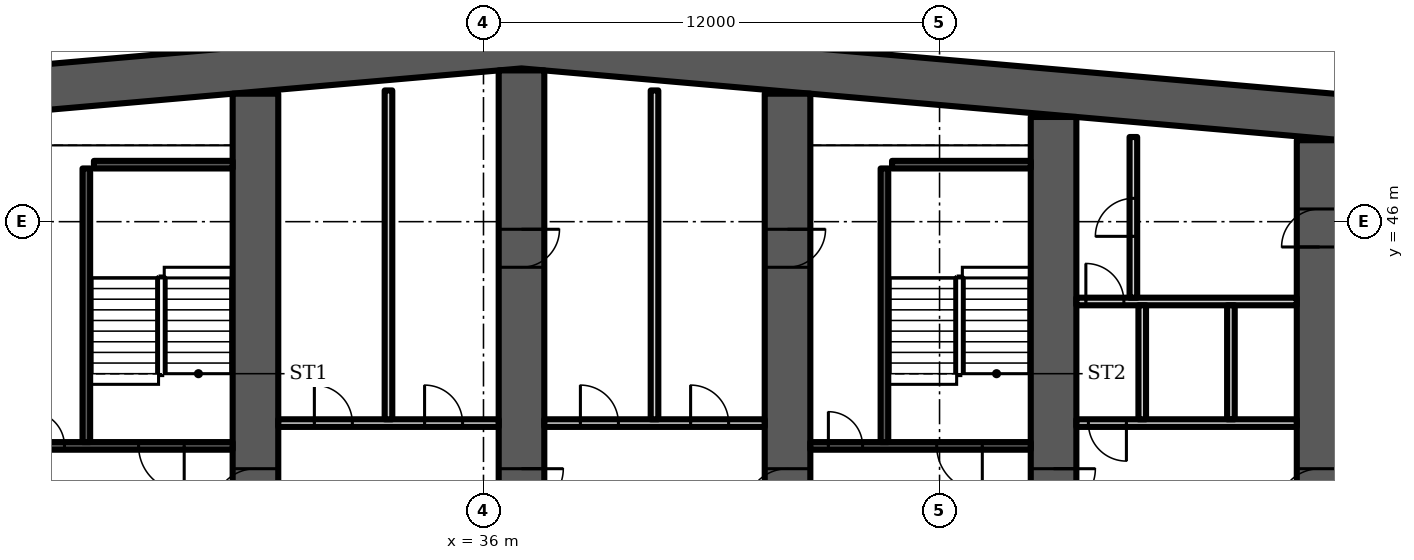
"""IFC4 building model, lengths in metres.
Left out: names, types, materials, properties, quantities, classifications, styles, units other than length and angle.
Written with IfcOpenShell. Run it as: python <this file> out.ifc"""

import sys

from ifc_helpers import new_model, si_unit, direction, frame, frame_2d, origin, place, context, subcontext, project, spatial, polyline, rectangle, outline, extrude, element, fill, save


model = new_model("IFC4")
c1 = context("Model", 3, precision=1e-05, world=origin(), true_north=direction((0.0, 1.0)))
c2 = subcontext(c1, "Body", "Model", "MODEL_VIEW")
j1 = project(units=[si_unit("LENGTHUNIT", "METRE"), si_unit("PLANEANGLEUNIT", "RADIAN")], contexts=[c1])
p1 = place(None, origin())
s1 = spatial("IfcSite", under=j1, at=p1, CompositionType="ELEMENT")
p2 = place(p1, origin())
s2 = spatial("IfcBuilding", under=s1, at=p2, CompositionType="ELEMENT")
p3 = place(p2, frame((0.0, 0.0, 59.5)))
s3 = spatial("IfcBuildingStorey", under=s2, at=p3, CompositionType="ELEMENT", Elevation=59.5)
p4 = place(p3, origin())
e1 = element("IfcWall", 1, at=p4, inside=s3, PredefinedType="SHEAR", context=c2, shape_type="SweptSolid", body=[
    extrude(outline(polyline([(9.0, 47.583), (37.0, 50.032), (65.0, 47.583), (65.0, 48.787), (37.0, 51.237), (9.0, 48.787), (9.0, 47.583)])), origin(), (0.0, 0.0, 1.0), 3.6),
])
p5 = place(p3, frame((30.0, 35.2, 0.0), z_axis=(0.0, 0.0, 1.0), x_axis=(0.0, 1.0, 0.0)))
e2 = element("IfcWall", 2, at=p5, inside=s3, PredefinedType="SHEAR", context=c2, shape_type="SweptSolid", body=[
    extrude(rectangle(XDim=14.168, YDim=1.2, at=frame_2d((7.084, 0.0))), origin(), (0.0, 0.0, 1.0), 3.6),
])
p6 = place(p5, frame((3.2, 0.0, 0.0)))
e3 = element("IfcOpeningElement", 3, at=p6, cuts=e2, PredefinedType="OPENING", context=c2, shape_type="SweptSolid", body=[
    extrude(rectangle(XDim=1.1, YDim=2.1, at=frame_2d((0.55, 1.05))), frame((0.0, 0.61, 0.0), z_axis=(0.0, -1.0, 0.0), x_axis=(1.0, 0.0, 0.0)), (0.0, 0.0, 1.0), 1.22),
])
p7 = place(p3, frame((37.0, 35.2, 0.0), z_axis=(0.0, 0.0, 1.0), x_axis=(0.0, 1.0, 0.0)))
e4 = element("IfcWall", 4, at=p7, inside=s3, PredefinedType="SHEAR", context=c2, shape_type="SweptSolid", body=[
    extrude(rectangle(XDim=14.78, YDim=1.2, at=frame_2d((7.39, 0.0))), origin(), (0.0, 0.0, 1.0), 3.6),
])
p8 = place(p7, frame((3.2, 0.0, 0.0)))
e5 = element("IfcOpeningElement", 5, at=p8, cuts=e4, PredefinedType="OPENING", context=c2, shape_type="SweptSolid", body=[
    extrude(rectangle(XDim=1.1, YDim=2.1, at=frame_2d((0.55, 1.05))), frame((0.0, 0.61, 0.0), z_axis=(0.0, -1.0, 0.0), x_axis=(1.0, 0.0, 0.0)), (0.0, 0.0, 1.0), 1.22),
])
p9 = place(p7, frame((9.6, 0.0, 0.0)))
e6 = element("IfcOpeningElement", 6, at=p9, cuts=e4, PredefinedType="OPENING", context=c2, shape_type="SweptSolid", body=[
    extrude(rectangle(XDim=1.0, YDim=2.1, at=frame_2d((0.5, 1.05))), frame((0.0, 0.61, 0.0), z_axis=(0.0, -1.0, 0.0), x_axis=(1.0, 0.0, 0.0)), (0.0, 0.0, 1.0), 1.22),
])
p10 = place(p3, frame((44.0, 35.2, 0.0), z_axis=(0.0, 0.0, 1.0), x_axis=(0.0, 1.0, 0.0)))
e7 = element("IfcWall", 7, at=p10, inside=s3, PredefinedType="SHEAR", context=c2, shape_type="SweptSolid", body=[
    extrude(rectangle(XDim=14.168, YDim=1.2, at=frame_2d((7.084, 0.0))), origin(), (0.0, 0.0, 1.0), 3.6),
])
p11 = place(p10, frame((3.2, 0.0, 0.0)))
e8 = element("IfcOpeningElement", 8, at=p11, cuts=e7, PredefinedType="OPENING", context=c2, shape_type="SweptSolid", body=[
    extrude(rectangle(XDim=1.1, YDim=2.1, at=frame_2d((0.55, 1.05))), frame((0.0, 0.61, 0.0), z_axis=(0.0, -1.0, 0.0), x_axis=(1.0, 0.0, 0.0)), (0.0, 0.0, 1.0), 1.22),
])
p12 = place(p10, frame((9.6, 0.0, 0.0)))
e9 = element("IfcOpeningElement", 9, at=p12, cuts=e7, PredefinedType="OPENING", context=c2, shape_type="SweptSolid", body=[
    extrude(rectangle(XDim=1.0, YDim=2.1, at=frame_2d((0.5, 1.05))), frame((0.0, 0.61, 0.0), z_axis=(0.0, -1.0, 0.0), x_axis=(1.0, 0.0, 0.0)), (0.0, 0.0, 1.0), 1.22),
])
p13 = place(p3, frame((51.0, 35.2, 0.0), z_axis=(0.0, 0.0, 1.0), x_axis=(0.0, 1.0, 0.0)))
e10 = element("IfcWall", 10, at=p13, inside=s3, PredefinedType="SHEAR", context=c2, shape_type="SweptSolid", body=[
    extrude(rectangle(XDim=13.555, YDim=1.2, at=frame_2d((6.778, 0.0))), origin(), (0.0, 0.0, 1.0), 3.6),
])
p14 = place(p13, frame((3.2, 0.0, 0.0)))
e11 = element("IfcOpeningElement", 11, at=p14, cuts=e10, PredefinedType="OPENING", context=c2, shape_type="SweptSolid", body=[
    extrude(rectangle(XDim=1.1, YDim=2.1, at=frame_2d((0.55, 1.05))), frame((0.0, 0.61, 0.0), z_axis=(0.0, -1.0, 0.0), x_axis=(1.0, 0.0, 0.0)), (0.0, 0.0, 1.0), 1.22),
])
p15 = place(p3, frame((58.0, 35.2, 0.0), z_axis=(0.0, 0.0, 1.0), x_axis=(0.0, 1.0, 0.0)))
e12 = element("IfcWall", 12, at=p15, inside=s3, PredefinedType="SHEAR", context=c2, shape_type="SweptSolid", body=[
    extrude(rectangle(XDim=12.943, YDim=1.2, at=frame_2d((6.471, 0.0))), origin(), (0.0, 0.0, 1.0), 3.6),
])
p16 = place(p15, frame((10.134, 0.0, 0.0)))
e13 = element("IfcOpeningElement", 13, at=p16, cuts=e12, PredefinedType="OPENING", context=c2, shape_type="SweptSolid", body=[
    extrude(rectangle(XDim=1.0, YDim=2.1, at=frame_2d((0.5, 1.05))), frame((0.0, 0.61, 0.0), z_axis=(0.0, -1.0, 0.0), x_axis=(1.0, 0.0, 0.0)), (0.0, 0.0, 1.0), 1.22),
])
p17 = place(p15, frame((3.2, 0.0, 0.0)))
e14 = element("IfcOpeningElement", 14, at=p17, cuts=e12, PredefinedType="OPENING", context=c2, shape_type="SweptSolid", body=[
    extrude(rectangle(XDim=1.1, YDim=2.1, at=frame_2d((0.55, 1.05))), frame((0.0, 0.61, 0.0), z_axis=(0.0, -1.0, 0.0), x_axis=(1.0, 0.0, 0.0)), (0.0, 0.0, 1.0), 1.22),
])
p18 = place(p3, frame((23.6, 40.1, 0.0), z_axis=(0.0, 0.0, 1.0), x_axis=(1.0, 0.0, 0.0)))
e15 = element("IfcWall", 15, at=p18, inside=s3, PredefinedType="SHEAR", context=c2, shape_type="SweptSolid", body=[
    extrude(rectangle(XDim=5.8, YDim=0.2, at=frame_2d((2.9, 0.0))), origin(), (0.0, 0.0, 1.0), 3.2),
])
p19 = place(p18, frame((3.325, 0.0, 0.0)))
e16 = element("IfcOpeningElement", 16, at=p19, cuts=e15, PredefinedType="OPENING", context=c2, shape_type="SweptSolid", body=[
    extrude(rectangle(XDim=1.2, YDim=2.1, at=frame_2d((0.6, 1.05))), frame((0.0, 0.11, 0.0), z_axis=(0.0, -1.0, 0.0), x_axis=(1.0, 0.0, 0.0)), (0.0, 0.0, 1.0), 0.22),
])
p20 = place(p18, frame((0.475, 0.0, 0.0)))
e17 = element("IfcOpeningElement", 17, at=p20, cuts=e15, PredefinedType="OPENING", context=c2, shape_type="SweptSolid", body=[
    extrude(rectangle(XDim=0.9, YDim=2.1, at=frame_2d((0.45, 1.05))), frame((0.0, 0.11, 0.0), z_axis=(0.0, -1.0, 0.0), x_axis=(1.0, 0.0, 0.0)), (0.0, 0.0, 1.0), 0.22),
])
p21 = place(p3, frame((25.55, 40.2, 0.0), z_axis=(0.0, 0.0, 1.0), x_axis=(0.0, 1.0, 0.0)))
e18 = element("IfcWall", 18, at=p21, inside=s3, PredefinedType="SHEAR", context=c2, shape_type="SweptSolid", body=[
    extrude(rectangle(XDim=7.2, YDim=0.2, at=frame_2d((3.6, 0.0))), origin(), (0.0, 0.0, 1.0), 3.2),
])
p22 = place(p3, frame((25.75, 47.5, 0.0), z_axis=(0.0, 0.0, 1.0), x_axis=(1.0, 0.0, 0.0)))
e19 = element("IfcWall", 19, at=p22, inside=s3, PredefinedType="SHEAR", context=c2, shape_type="SweptSolid", body=[
    extrude(rectangle(XDim=3.65, YDim=0.2, at=frame_2d((1.825, 0.0))), origin(), (0.0, 0.0, 1.0), 3.2),
])
p23 = place(p3, frame((30.6, 40.7, 0.0), z_axis=(0.0, 0.0, 1.0), x_axis=(1.0, 0.0, 0.0)))
e20 = element("IfcWall", 20, at=p23, inside=s3, PredefinedType="PARTITIONING", context=c2, shape_type="SweptSolid", body=[
    extrude(rectangle(XDim=5.8, YDim=0.2, at=frame_2d((2.9, 0.0))), origin(), (0.0, 0.0, 1.0), 3.2),
])
p24 = place(p23, frame((0.95, 0.0, 0.0)))
e21 = element("IfcOpeningElement", 21, at=p24, cuts=e20, PredefinedType="OPENING", context=c2, shape_type="SweptSolid", body=[
    extrude(rectangle(XDim=1.0, YDim=2.1, at=frame_2d((0.5, 1.05))), frame((0.0, 0.11, 0.0), z_axis=(0.0, -1.0, 0.0), x_axis=(1.0, 0.0, 0.0)), (0.0, 0.0, 1.0), 0.22),
])
p25 = place(p23, frame((3.85, 0.0, 0.0)))
e22 = element("IfcOpeningElement", 22, at=p25, cuts=e20, PredefinedType="OPENING", context=c2, shape_type="SweptSolid", body=[
    extrude(rectangle(XDim=1.0, YDim=2.1, at=frame_2d((0.5, 1.05))), frame((0.0, 0.11, 0.0), z_axis=(0.0, -1.0, 0.0), x_axis=(1.0, 0.0, 0.0)), (0.0, 0.0, 1.0), 0.22),
])
p26 = place(p3, frame((33.5, 40.8, 0.0), z_axis=(0.0, 0.0, 1.0), x_axis=(0.0, 1.0, 0.0)))
e23 = element("IfcWall", 23, at=p26, inside=s3, PredefinedType="PARTITIONING", context=c2, shape_type="SweptSolid", body=[
    extrude(rectangle(XDim=8.653, YDim=0.2, at=frame_2d((4.326, 0.0))), origin(), (0.0, 0.0, 1.0), 3.2),
])
p27 = place(p3, frame((37.6, 40.7, 0.0), z_axis=(0.0, 0.0, 1.0), x_axis=(1.0, 0.0, 0.0)))
e24 = element("IfcWall", 24, at=p27, inside=s3, PredefinedType="PARTITIONING", context=c2, shape_type="SweptSolid", body=[
    extrude(rectangle(XDim=5.8, YDim=0.2, at=frame_2d((2.9, 0.0))), origin(), (0.0, 0.0, 1.0), 3.2),
])
p28 = place(p27, frame((0.95, 0.0, 0.0)))
e25 = element("IfcOpeningElement", 25, at=p28, cuts=e24, PredefinedType="OPENING", context=c2, shape_type="SweptSolid", body=[
    extrude(rectangle(XDim=1.0, YDim=2.1, at=frame_2d((0.5, 1.05))), frame((0.0, 0.11, 0.0), z_axis=(0.0, -1.0, 0.0), x_axis=(1.0, 0.0, 0.0)), (0.0, 0.0, 1.0), 0.22),
])
p29 = place(p27, frame((3.85, 0.0, 0.0)))
e26 = element("IfcOpeningElement", 26, at=p29, cuts=e24, PredefinedType="OPENING", context=c2, shape_type="SweptSolid", body=[
    extrude(rectangle(XDim=1.0, YDim=2.1, at=frame_2d((0.5, 1.05))), frame((0.0, 0.11, 0.0), z_axis=(0.0, -1.0, 0.0), x_axis=(1.0, 0.0, 0.0)), (0.0, 0.0, 1.0), 0.22),
])
p30 = place(p3, frame((40.5, 40.8, 0.0), z_axis=(0.0, 0.0, 1.0), x_axis=(0.0, 1.0, 0.0)))
e27 = element("IfcWall", 27, at=p30, inside=s3, PredefinedType="PARTITIONING", context=c2, shape_type="SweptSolid", body=[
    extrude(rectangle(XDim=8.653, YDim=0.2, at=frame_2d((4.326, 0.0))), origin(), (0.0, 0.0, 1.0), 3.2),
])
p31 = place(p3, frame((44.6, 40.1, 0.0), z_axis=(0.0, 0.0, 1.0), x_axis=(1.0, 0.0, 0.0)))
e28 = element("IfcWall", 28, at=p31, inside=s3, PredefinedType="SHEAR", context=c2, shape_type="SweptSolid", body=[
    extrude(rectangle(XDim=5.8, YDim=0.2, at=frame_2d((2.9, 0.0))), origin(), (0.0, 0.0, 1.0), 3.2),
])
p32 = place(p31, frame((3.325, 0.0, 0.0)))
e29 = element("IfcOpeningElement", 29, at=p32, cuts=e28, PredefinedType="OPENING", context=c2, shape_type="SweptSolid", body=[
    extrude(rectangle(XDim=1.2, YDim=2.1, at=frame_2d((0.6, 1.05))), frame((0.0, 0.11, 0.0), z_axis=(0.0, -1.0, 0.0), x_axis=(1.0, 0.0, 0.0)), (0.0, 0.0, 1.0), 0.22),
])
p33 = place(p31, frame((0.475, 0.0, 0.0)))
e30 = element("IfcOpeningElement", 30, at=p33, cuts=e28, PredefinedType="OPENING", context=c2, shape_type="SweptSolid", body=[
    extrude(rectangle(XDim=0.9, YDim=2.1, at=frame_2d((0.45, 1.05))), frame((0.0, 0.11, 0.0), z_axis=(0.0, -1.0, 0.0), x_axis=(1.0, 0.0, 0.0)), (0.0, 0.0, 1.0), 0.22),
])
p34 = place(p3, frame((46.55, 40.2, 0.0), z_axis=(0.0, 0.0, 1.0), x_axis=(0.0, 1.0, 0.0)))
e31 = element("IfcWall", 31, at=p34, inside=s3, PredefinedType="SHEAR", context=c2, shape_type="SweptSolid", body=[
    extrude(rectangle(XDim=7.2, YDim=0.2, at=frame_2d((3.6, 0.0))), origin(), (0.0, 0.0, 1.0), 3.2),
])
p35 = place(p3, frame((46.75, 47.5, 0.0), z_axis=(0.0, 0.0, 1.0), x_axis=(1.0, 0.0, 0.0)))
e32 = element("IfcWall", 32, at=p35, inside=s3, PredefinedType="SHEAR", context=c2, shape_type="SweptSolid", body=[
    extrude(rectangle(XDim=3.65, YDim=0.2, at=frame_2d((1.825, 0.0))), origin(), (0.0, 0.0, 1.0), 3.2),
])
p36 = place(p3, frame((51.6, 40.7, 0.0), z_axis=(0.0, 0.0, 1.0), x_axis=(1.0, 0.0, 0.0)))
e33 = element("IfcWall", 33, at=p36, inside=s3, PredefinedType="PARTITIONING", context=c2, shape_type="SweptSolid", body=[
    extrude(rectangle(XDim=5.8, YDim=0.2, at=frame_2d((2.9, 0.0))), origin(), (0.0, 0.0, 1.0), 3.2),
])
p37 = place(p36, frame((0.317, 0.0, 0.0)))
e34 = element("IfcOpeningElement", 34, at=p37, cuts=e33, PredefinedType="OPENING", context=c2, shape_type="SweptSolid", body=[
    extrude(rectangle(XDim=1.0, YDim=2.1, at=frame_2d((0.5, 1.05))), frame((0.0, 0.11, 0.0), z_axis=(0.0, -1.0, 0.0), x_axis=(1.0, 0.0, 0.0)), (0.0, 0.0, 1.0), 0.22),
])
p38 = place(p3, frame((51.6, 43.9, 0.0), z_axis=(0.0, 0.0, 1.0), x_axis=(1.0, 0.0, 0.0)))
e35 = element("IfcWall", 35, at=p38, inside=s3, PredefinedType="PARTITIONING", context=c2, shape_type="SweptSolid", body=[
    extrude(rectangle(XDim=5.8, YDim=0.2, at=frame_2d((2.9, 0.0))), origin(), (0.0, 0.0, 1.0), 3.2),
])
p39 = place(p38, frame((0.25, 0.0, 0.0)))
e36 = element("IfcOpeningElement", 36, at=p39, cuts=e35, PredefinedType="OPENING", context=c2, shape_type="SweptSolid", body=[
    extrude(rectangle(XDim=1.0, YDim=2.1, at=frame_2d((0.5, 1.05))), frame((0.0, 0.11, 0.0), z_axis=(0.0, -1.0, 0.0), x_axis=(1.0, 0.0, 0.0)), (0.0, 0.0, 1.0), 0.22),
])
p40 = place(p3, frame((0.0, 0.0, -0.0)))
e37 = element("IfcWall", 37, at=p40, inside=s3, PredefinedType="PARTITIONING", context=c2, shape_type="SweptSolid", body=[
    extrude(outline(polyline([(53.233, 40.8), (53.233, 43.8), (53.433, 43.8), (53.433, 40.8), (53.233, 40.8)])), origin(), (0.0, 0.0, 1.0), 3.2),
])
p41 = place(p3, frame((0.0, 0.0, -0.0)))
e38 = element("IfcWall", 38, at=p41, inside=s3, PredefinedType="PARTITIONING", context=c2, shape_type="SweptSolid", body=[
    extrude(outline(polyline([(55.567, 40.8), (55.567, 43.8), (55.767, 43.8), (55.767, 40.8), (55.567, 40.8)])), origin(), (0.0, 0.0, 1.0), 3.2),
])
p42 = place(p3, frame((53.1, 44.0, 0.0), z_axis=(0.0, 0.0, 1.0), x_axis=(0.0, 1.0, 0.0)))
e39 = element("IfcWall", 39, at=p42, inside=s3, PredefinedType="PARTITIONING", context=c2, shape_type="SweptSolid", body=[
    extrude(rectangle(XDim=4.228, YDim=0.2, at=frame_2d((2.114, 0.0))), origin(), (0.0, 0.0, 1.0), 3.2),
])
p43 = place(p42, frame((1.614, 0.0, 0.0)))
e40 = element("IfcOpeningElement", 40, at=p43, cuts=e39, PredefinedType="OPENING", context=c2, shape_type="SweptSolid", body=[
    extrude(rectangle(XDim=1.0, YDim=2.1, at=frame_2d((0.5, 1.05))), frame((0.0, 0.11, 0.0), z_axis=(0.0, -1.0, 0.0), x_axis=(1.0, 0.0, 0.0)), (0.0, 0.0, 1.0), 0.22),
])
p44 = place(p19, origin())
e41 = element("IfcDoor", 41, at=p44, inside=s3, OperationType="SINGLE_SWING_RIGHT", PredefinedType="DOOR", context=c2, shape_type="SweptSolid", body=[
    extrude(rectangle(XDim=1.2, YDim=2.1, at=frame_2d((0.6, 1.05))), frame((0.0, 0.025, 0.0), z_axis=(0.0, -1.0, 0.0), x_axis=(1.0, 0.0, 0.0)), (0.0, 0.0, 1.0), 0.05),
])
fill(e16, e41)
p45 = place(p20, origin())
e42 = element("IfcDoor", 42, at=p45, inside=s3, OperationType="SINGLE_SWING_LEFT", PredefinedType="DOOR", context=c2, shape_type="SweptSolid", body=[
    extrude(rectangle(XDim=0.9, YDim=2.1, at=frame_2d((0.45, 1.05))), frame((0.0, 0.025, 0.0), z_axis=(0.0, -1.0, 0.0), x_axis=(1.0, 0.0, 0.0)), (0.0, 0.0, 1.0), 0.05),
])
fill(e17, e42)
p46 = place(p24, origin())
e43 = element("IfcDoor", 43, at=p46, inside=s3, OperationType="SINGLE_SWING_LEFT", PredefinedType="DOOR", context=c2, shape_type="SweptSolid", body=[
    extrude(rectangle(XDim=1.0, YDim=2.1, at=frame_2d((0.5, 1.05))), frame((0.0, 0.025, 0.0), z_axis=(0.0, -1.0, 0.0), x_axis=(1.0, 0.0, 0.0)), (0.0, 0.0, 1.0), 0.05),
])
fill(e21, e43)
p47 = place(p25, origin())
e44 = element("IfcDoor", 44, at=p47, inside=s3, OperationType="SINGLE_SWING_LEFT", PredefinedType="DOOR", context=c2, shape_type="SweptSolid", body=[
    extrude(rectangle(XDim=1.0, YDim=2.1, at=frame_2d((0.5, 1.05))), frame((0.0, 0.025, 0.0), z_axis=(0.0, -1.0, 0.0), x_axis=(1.0, 0.0, 0.0)), (0.0, 0.0, 1.0), 0.05),
])
fill(e22, e44)
p48 = place(p28, origin())
e45 = element("IfcDoor", 45, at=p48, inside=s3, OperationType="SINGLE_SWING_LEFT", PredefinedType="DOOR", context=c2, shape_type="SweptSolid", body=[
    extrude(rectangle(XDim=1.0, YDim=2.1, at=frame_2d((0.5, 1.05))), frame((0.0, 0.025, 0.0), z_axis=(0.0, -1.0, 0.0), x_axis=(1.0, 0.0, 0.0)), (0.0, 0.0, 1.0), 0.05),
])
fill(e25, e45)
p49 = place(p29, origin())
e46 = element("IfcDoor", 46, at=p49, inside=s3, OperationType="SINGLE_SWING_LEFT", PredefinedType="DOOR", context=c2, shape_type="SweptSolid", body=[
    extrude(rectangle(XDim=1.0, YDim=2.1, at=frame_2d((0.5, 1.05))), frame((0.0, 0.025, 0.0), z_axis=(0.0, -1.0, 0.0), x_axis=(1.0, 0.0, 0.0)), (0.0, 0.0, 1.0), 0.05),
])
fill(e26, e46)
p50 = place(p32, origin())
e47 = element("IfcDoor", 47, at=p50, inside=s3, OperationType="SINGLE_SWING_RIGHT", PredefinedType="DOOR", context=c2, shape_type="SweptSolid", body=[
    extrude(rectangle(XDim=1.2, YDim=2.1, at=frame_2d((0.6, 1.05))), frame((0.0, 0.025, 0.0), z_axis=(0.0, -1.0, 0.0), x_axis=(1.0, 0.0, 0.0)), (0.0, 0.0, 1.0), 0.05),
])
fill(e29, e47)
p51 = place(p33, origin())
e48 = element("IfcDoor", 48, at=p51, inside=s3, OperationType="SINGLE_SWING_LEFT", PredefinedType="DOOR", context=c2, shape_type="SweptSolid", body=[
    extrude(rectangle(XDim=0.9, YDim=2.1, at=frame_2d((0.45, 1.05))), frame((0.0, 0.025, 0.0), z_axis=(0.0, -1.0, 0.0), x_axis=(1.0, 0.0, 0.0)), (0.0, 0.0, 1.0), 0.05),
])
fill(e30, e48)
p52 = place(p37, origin())
e49 = element("IfcDoor", 49, at=p52, inside=s3, OperationType="SINGLE_SWING_RIGHT", PredefinedType="DOOR", context=c2, shape_type="SweptSolid", body=[
    extrude(rectangle(XDim=1.0, YDim=2.1, at=frame_2d((0.5, 1.05))), frame((0.0, 0.025, 0.0), z_axis=(0.0, -1.0, 0.0), x_axis=(1.0, 0.0, 0.0)), (0.0, 0.0, 1.0), 0.05),
])
fill(e34, e49)
p53 = place(p39, origin())
e50 = element("IfcDoor", 50, at=p53, inside=s3, OperationType="SINGLE_SWING_LEFT", PredefinedType="DOOR", context=c2, shape_type="SweptSolid", body=[
    extrude(rectangle(XDim=1.0, YDim=2.1, at=frame_2d((0.5, 1.05))), frame((0.0, 0.025, 0.0), z_axis=(0.0, -1.0, 0.0), x_axis=(1.0, 0.0, 0.0)), (0.0, 0.0, 1.0), 0.05),
])
fill(e36, e50)
p54 = place(p43, origin())
e51 = element("IfcDoor", 51, at=p54, inside=s3, OperationType="SINGLE_SWING_LEFT", PredefinedType="DOOR", context=c2, shape_type="SweptSolid", body=[
    extrude(rectangle(XDim=1.0, YDim=2.1, at=frame_2d((0.5, 1.05))), frame((0.0, 0.025, 0.0), z_axis=(0.0, -1.0, 0.0), x_axis=(1.0, 0.0, 0.0)), (0.0, 0.0, 1.0), 0.05),
])
fill(e40, e51)
p55 = place(p16, origin())
e52 = element("IfcDoor", 52, at=p55, inside=s3, OperationType="SINGLE_SWING_LEFT", PredefinedType="DOOR", context=c2, shape_type="SweptSolid", body=[
    extrude(rectangle(XDim=1.0, YDim=2.1, at=frame_2d((0.5, 1.05))), frame((0.0, 0.6, 0.0), z_axis=(0.0, -1.0, 0.0), x_axis=(1.0, 0.0, 0.0)), (0.0, 0.0, 1.0), 1.199),
])
fill(e13, e52)
p56 = place(p6, origin())
e53 = element("IfcDoor", 53, at=p56, inside=s3, OperationType="SINGLE_SWING_LEFT", PredefinedType="DOOR", context=c2, shape_type="SweptSolid", body=[
    extrude(rectangle(XDim=1.1, YDim=2.1, at=frame_2d((0.55, 1.05))), frame((0.0, 0.025, 0.0), z_axis=(0.0, -1.0, 0.0), x_axis=(1.0, 0.0, 0.0)), (0.0, 0.0, 1.0), 0.05),
])
fill(e3, e53)
p57 = place(p8, origin())
e54 = element("IfcDoor", 54, at=p57, inside=s3, OperationType="SINGLE_SWING_RIGHT", PredefinedType="DOOR", context=c2, shape_type="SweptSolid", body=[
    extrude(rectangle(XDim=1.1, YDim=2.1, at=frame_2d((0.55, 1.05))), frame((0.0, 0.025, 0.0), z_axis=(0.0, -1.0, 0.0), x_axis=(1.0, 0.0, 0.0)), (0.0, 0.0, 1.0), 0.05),
])
fill(e5, e54)
p58 = place(p9, origin())
e55 = element("IfcDoor", 55, at=p58, inside=s3, OperationType="SINGLE_SWING_RIGHT", PredefinedType="DOOR", context=c2, shape_type="SweptSolid", body=[
    extrude(rectangle(XDim=1.0, YDim=2.1, at=frame_2d((0.5, 1.05))), frame((0.0, 0.6, 0.0), z_axis=(0.0, -1.0, 0.0), x_axis=(1.0, 0.0, 0.0)), (0.0, 0.0, 1.0), 1.199),
])
fill(e6, e55)
p59 = place(p11, origin())
e56 = element("IfcDoor", 56, at=p59, inside=s3, OperationType="SINGLE_SWING_LEFT", PredefinedType="DOOR", context=c2, shape_type="SweptSolid", body=[
    extrude(rectangle(XDim=1.1, YDim=2.1, at=frame_2d((0.55, 1.05))), frame((0.0, 0.025, 0.0), z_axis=(0.0, -1.0, 0.0), x_axis=(1.0, 0.0, 0.0)), (0.0, 0.0, 1.0), 0.05),
])
fill(e8, e56)
p60 = place(p12, origin())
e57 = element("IfcDoor", 57, at=p60, inside=s3, OperationType="SINGLE_SWING_RIGHT", PredefinedType="DOOR", context=c2, shape_type="SweptSolid", body=[
    extrude(rectangle(XDim=1.0, YDim=2.1, at=frame_2d((0.5, 1.05))), frame((0.0, 0.6, 0.0), z_axis=(0.0, -1.0, 0.0), x_axis=(1.0, 0.0, 0.0)), (0.0, 0.0, 1.0), 1.199),
])
fill(e9, e57)
p61 = place(p14, origin())
e58 = element("IfcDoor", 58, at=p61, inside=s3, OperationType="SINGLE_SWING_RIGHT", PredefinedType="DOOR", context=c2, shape_type="SweptSolid", body=[
    extrude(rectangle(XDim=1.1, YDim=2.1, at=frame_2d((0.55, 1.05))), frame((0.0, 0.025, 0.0), z_axis=(0.0, -1.0, 0.0), x_axis=(1.0, 0.0, 0.0)), (0.0, 0.0, 1.0), 0.05),
])
fill(e11, e58)
p62 = place(p17, origin())
e59 = element("IfcDoor", 59, at=p62, inside=s3, OperationType="SINGLE_SWING_LEFT", PredefinedType="DOOR", context=c2, shape_type="SweptSolid", body=[
    extrude(rectangle(XDim=1.1, YDim=2.1, at=frame_2d((0.55, 1.05))), frame((0.0, 0.025, 0.0), z_axis=(0.0, -1.0, 0.0), x_axis=(1.0, 0.0, 0.0)), (0.0, 0.0, 1.0), 0.05),
])
fill(e14, e59)
save(model, sys.argv[1])
